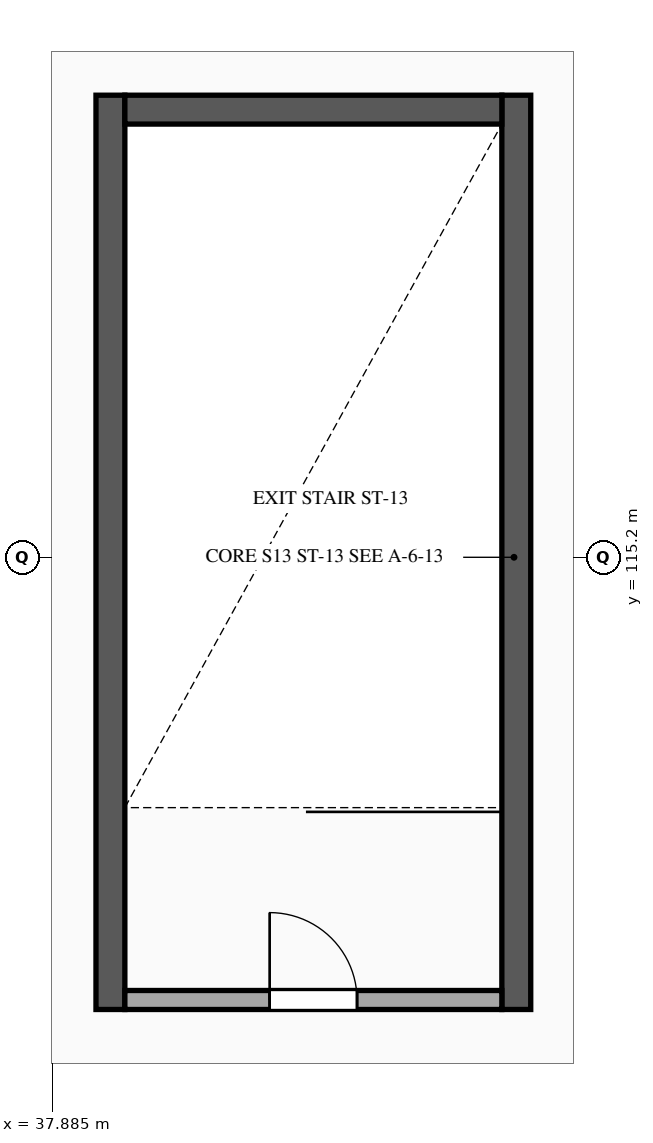
"""IFC4 building model, lengths in metres.
Left out: names, types, materials, properties, quantities, classifications, styles, units other than length and angle.
Written with IfcOpenShell. Run it as: python <this file> out.ifc"""

import sys

from ifc_helpers import new_model, si_unit, direction, frame, frame_2d, origin, place, context, subcontext, project, spatial, rectangle, extrude, element, fill, save


model = new_model("IFC4")
c1 = context("Model", 3, precision=1e-05, world=origin(), true_north=direction((0.0, 1.0)))
c2 = subcontext(c1, "Body", "Model", "MODEL_VIEW")
j1 = project(units=[si_unit("LENGTHUNIT", "METRE"), si_unit("PLANEANGLEUNIT", "RADIAN")], contexts=[c1])
p1 = place(None, origin())
s1 = spatial("IfcSite", under=j1, at=p1, CompositionType="ELEMENT")
p2 = place(p1, origin())
s2 = spatial("IfcBuilding", under=s1, at=p2, CompositionType="ELEMENT")
p3 = place(p2, frame((0.0, 0.0, 24.3)))
s3 = spatial("IfcBuildingStorey", under=s2, at=p3, CompositionType="ELEMENT", Elevation=24.3)
for number, where, z_axis, x_axis in (
    (1, (38.65, 109.25, 0.0), (0.0, 0.0, 1.0), (0.0, 1.0, 0.0)),
    (2, (43.99, 121.28, 0.0), (0.0, 0.0, 1.0), (0.0, -1.0, 0.0)),
):
    element("IfcWall", number, at=place(p3, frame(where, z_axis=z_axis, x_axis=x_axis)), inside=s3, PredefinedType="SHEAR", context=c2, shape_type="SweptSolid", body=[
        extrude(rectangle(XDim=12.03, YDim=0.38, at=frame_2d((6.015, 0.0))), origin(), (0.0, 0.0, 1.0), 4.26),
    ])
p4 = place(p3, frame((38.84, 121.09, 0.0), z_axis=(0.0, 0.0, 1.0), x_axis=(1.0, 0.0, 0.0)))
e3 = element("IfcWall", 3, at=p4, inside=s3, PredefinedType="SHEAR", context=c2, shape_type="SweptSolid", body=[
    extrude(rectangle(XDim=4.96, YDim=0.38, at=frame_2d((2.48, 0.0))), origin(), (0.0, 0.0, 1.0), 4.26),
])
p5 = place(p3, frame((38.84, 109.375, 0.0), z_axis=(0.0, 0.0, 1.0), x_axis=(1.0, 0.0, 0.0)))
e4 = element("IfcWall", 4, at=p5, inside=s3, PredefinedType="STANDARD", context=c2, shape_type="SweptSolid", body=[
    extrude(rectangle(XDim=4.96, YDim=0.25, at=frame_2d((2.48, 0.0))), origin(), (0.0, 0.0, 1.0), 4.26),
])
p6 = place(p5, frame((1.905, 0.0, 0.0)))
e5 = element("IfcOpeningElement", 5, at=p6, cuts=e4, PredefinedType="OPENING", context=c2, shape_type="SweptSolid", body=[
    extrude(rectangle(XDim=1.15, YDim=2.2, at=frame_2d((0.575, 1.1))), frame((0.0, 0.135, 0.0), z_axis=(0.0, -1.0, 0.0), x_axis=(1.0, 0.0, 0.0)), (0.0, 0.0, 1.0), 0.27),
])
p7 = place(p6, origin())
e6 = element("IfcDoor", 6, at=p7, inside=s3, OperationType="SINGLE_SWING_LEFT", PredefinedType="DOOR", context=c2, shape_type="SweptSolid", body=[
    extrude(rectangle(XDim=1.15, YDim=2.2, at=frame_2d((0.575, 1.1))), frame((0.0, 0.025, 0.0), z_axis=(0.0, -1.0, 0.0), x_axis=(1.0, 0.0, 0.0)), (0.0, 0.0, 1.0), 0.05),
])
fill(e5, e6)
save(model, sys.argv[1])
